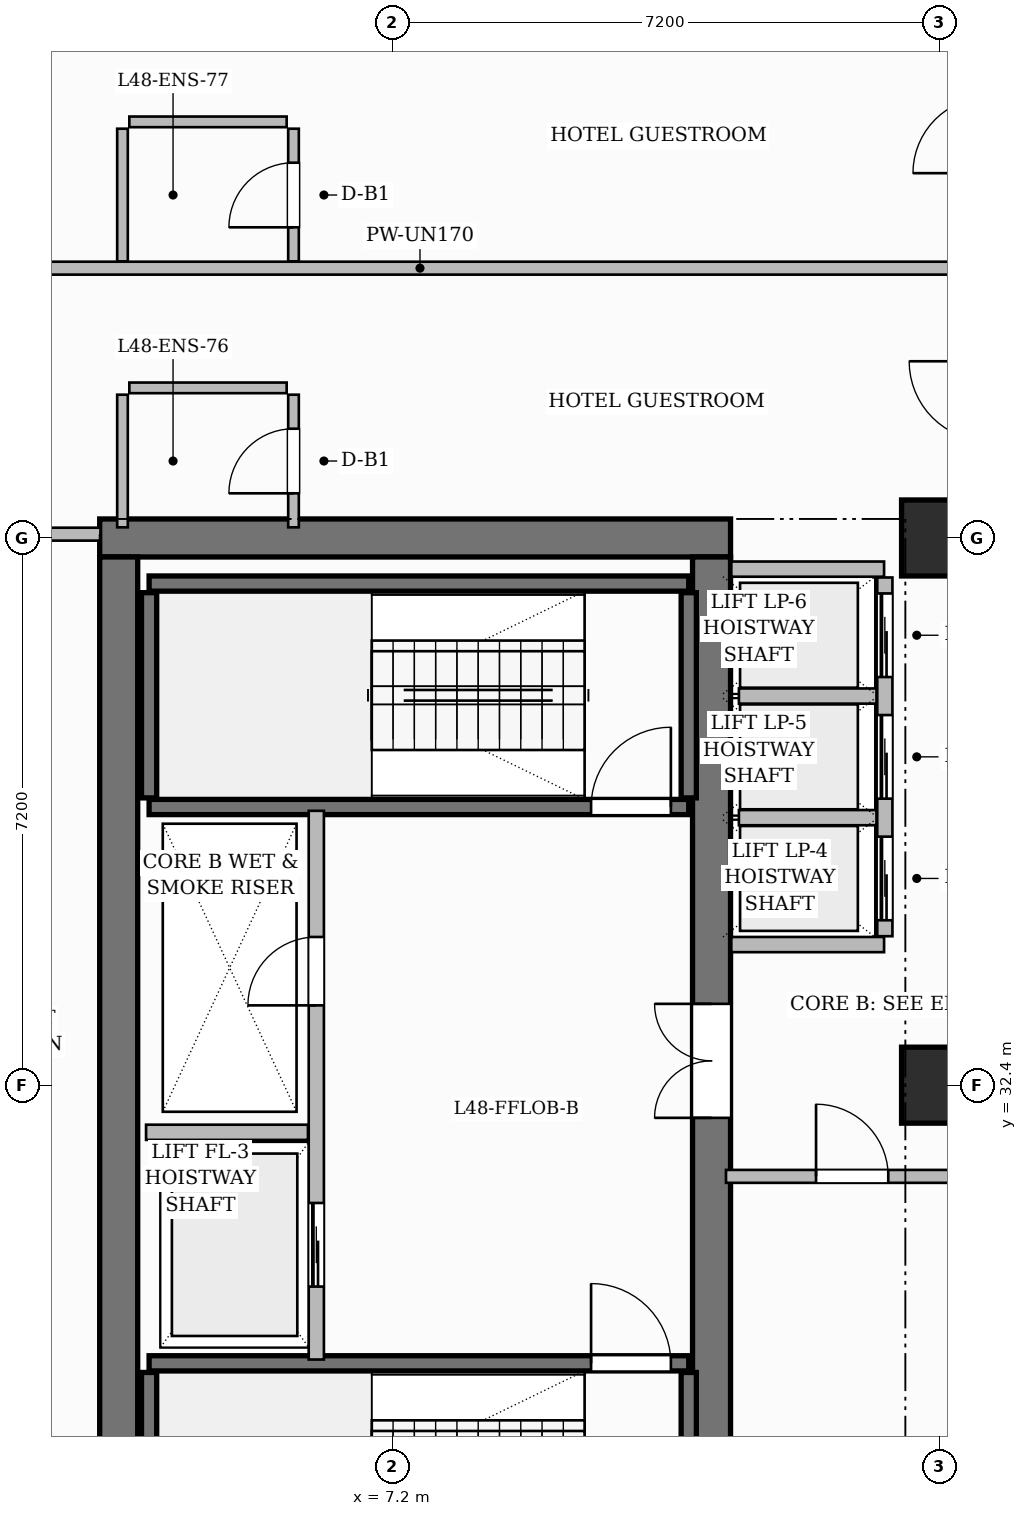
"""IFC4 building model, lengths in metres.
Left out: names, types, materials, properties, quantities, classifications, styles, units other than length and angle.
Written with IfcOpenShell. Run it as: python <this file> out.ifc"""

import sys

from ifc_helpers import new_model, si_unit, direction, frame, frame_2d, origin, origin_2d, place, context, subcontext, project, spatial, rectangle, extrude, source, transform, mapped, element, fill, save


model = new_model("IFC4")
c1 = context("Model", 3, precision=1e-05, world=origin(), true_north=direction((0.0, 1.0)))
c2 = subcontext(c1, "Body", "Model", "MODEL_VIEW")
j1 = project(units=[si_unit("LENGTHUNIT", "METRE"), si_unit("PLANEANGLEUNIT", "RADIAN")], contexts=[c1])
p1 = place(None, origin())
s1 = spatial("IfcSite", under=j1, at=p1, CompositionType="ELEMENT")
p2 = place(p1, origin())
s2 = spatial("IfcBuilding", under=s1, at=p2, CompositionType="ELEMENT")
p3 = place(p2, frame((0.0, 0.0, 192.65)))
s3 = spatial("IfcBuildingStorey", under=s2, at=p3, CompositionType="ELEMENT", Elevation=192.65)
p4 = place(p3, frame((3.35, 39.6, 0.0), z_axis=(0.0, 0.0, 1.0), x_axis=(1.0, 0.0, 0.0)))
e1 = element("IfcWall", 1, at=p4, inside=s3, PredefinedType="SHEAR", context=c2, shape_type="SweptSolid", body=[
    extrude(rectangle(XDim=8.3, YDim=0.5, at=frame_2d((4.15, 0.0))), origin(), (0.0, 0.0, 1.0), 3.85),
])
p5 = place(p3, frame((3.6, 25.45, 0.0), z_axis=(0.0, 0.0, 1.0), x_axis=(0.0, 1.0, 0.0)))
e2 = element("IfcWall", 2, at=p5, inside=s3, PredefinedType="SHEAR", context=c2, shape_type="SweptSolid", body=[
    extrude(rectangle(XDim=13.9, YDim=0.5, at=frame_2d((6.95, 0.0))), origin(), (0.0, 0.0, 1.0), 3.85),
])
p6 = place(p3, frame((11.4, 25.45, 0.0), z_axis=(0.0, 0.0, 1.0), x_axis=(0.0, 1.0, 0.0)))
e3 = element("IfcWall", 3, at=p6, inside=s3, PredefinedType="SHEAR", context=c2, shape_type="SweptSolid", body=[
    extrude(rectangle(XDim=13.9, YDim=0.5, at=frame_2d((6.95, 0.0))), origin(), (0.0, 0.0, 1.0), 3.85),
])
p7 = place(p6, frame((6.52, 0.0, 0.0)))
e4 = element("IfcOpeningElement", 4, at=p7, cuts=e3, PredefinedType="OPENING", context=c2, shape_type="SweptSolid", body=[
    extrude(rectangle(XDim=1.5, YDim=2.2, at=frame_2d((0.75, 1.1))), frame((0.0, 0.26, 0.0), z_axis=(0.0, -1.0, 0.0), x_axis=(1.0, 0.0, 0.0)), (0.0, 0.0, 1.0), 0.52),
])
m1 = source(origin(), c2, "Body", "SweptSolid", [
    extrude(rectangle(XDim=1.0, YDim=1.0, at=origin_2d()), origin(), (0.0, 0.0, 1.0), 3.85),
])
for number, where, z_axis, x_axis in (
    (5, (14.4, 32.4, 0.0), (0.0, 0.0, 1.0), (1.0, 0.0, 0.0)),
    (6, (14.4, 39.6, 0.0), (0.0, 0.0, 1.0), (1.0, 0.0, 0.0)),
):
    element("IfcColumn", number, at=place(p3, frame(where, z_axis=z_axis, x_axis=x_axis)), inside=s3, PredefinedType="COLUMN", context=c2, shape_type="MappedRepresentation", body=[
        mapped(m1, transform((0.0, 0.0, 0.0), scale=1.0)),
    ])
for number, where, z_axis, x_axis in (
    (7, (4.0, 25.92, 0.0), (0.0, 0.0, 1.0), (0.0, 1.0, 0.0)),
    (8, (11.1, 25.92, 0.0), (0.0, 0.0, 1.0), (0.0, 1.0, 0.0)),
):
    element("IfcWall", number, at=place(p3, frame(where, z_axis=z_axis, x_axis=x_axis)), inside=s3, PredefinedType="SHEAR", context=c2, shape_type="SweptSolid", body=[
        extrude(rectangle(XDim=2.7, YDim=0.2, at=frame_2d((1.35, 0.0))), origin(), (0.0, 0.0, 1.0), 3.85),
    ])
p8 = place(p3, frame((4.0, 28.74, 0.0), z_axis=(0.0, 0.0, 1.0), x_axis=(1.0, 0.0, 0.0)))
e9 = element("IfcWall", 9, at=p8, inside=s3, PredefinedType="SHEAR", context=c2, shape_type="SweptSolid", body=[
    extrude(rectangle(XDim=7.1, YDim=0.2, at=frame_2d((3.55, 0.0))), origin(), (0.0, 0.0, 1.0), 3.85),
])
p9 = place(p8, frame((5.815, 0.0, 0.0)))
e10 = element("IfcOpeningElement", 10, at=p9, cuts=e9, PredefinedType="OPENING", context=c2, shape_type="SweptSolid", body=[
    extrude(rectangle(XDim=1.05, YDim=2.2, at=frame_2d((0.525, 1.1))), frame((0.0, 0.11, 0.0), z_axis=(0.0, -1.0, 0.0), x_axis=(1.0, 0.0, 0.0)), (0.0, 0.0, 1.0), 0.22),
])
p10 = place(p3, frame((4.0, 39.0, 0.0), z_axis=(0.0, 0.0, 1.0), x_axis=(1.0, 0.0, 0.0)))
e11 = element("IfcWall", 11, at=p10, inside=s3, PredefinedType="SHEAR", context=c2, shape_type="SweptSolid", body=[
    extrude(rectangle(XDim=7.1, YDim=0.2, at=frame_2d((3.55, 0.0))), origin(), (0.0, 0.0, 1.0), 3.85),
])
for number, where, z_axis, x_axis in (
    (12, (4.0, 36.18, 0.0), (0.0, 0.0, 1.0), (0.0, 1.0, 0.0)),
    (13, (11.1, 36.18, 0.0), (0.0, 0.0, 1.0), (0.0, 1.0, 0.0)),
):
    element("IfcWall", number, at=place(p3, frame(where, z_axis=z_axis, x_axis=x_axis)), inside=s3, PredefinedType="SHEAR", context=c2, shape_type="SweptSolid", body=[
        extrude(rectangle(XDim=2.7, YDim=0.2, at=frame_2d((1.35, 0.0))), origin(), (0.0, 0.0, 1.0), 3.85),
    ])
p11 = place(p3, frame((4.0, 36.06, 0.0), z_axis=(0.0, 0.0, 1.0), x_axis=(1.0, 0.0, 0.0)))
e14 = element("IfcWall", 14, at=p11, inside=s3, PredefinedType="SHEAR", context=c2, shape_type="SweptSolid", body=[
    extrude(rectangle(XDim=7.1, YDim=0.2, at=frame_2d((3.55, 0.0))), origin(), (0.0, 0.0, 1.0), 3.85),
])
p12 = place(p11, frame((5.815, 0.0, 0.0)))
e15 = element("IfcOpeningElement", 15, at=p12, cuts=e14, PredefinedType="OPENING", context=c2, shape_type="SweptSolid", body=[
    extrude(rectangle(XDim=1.05, YDim=2.2, at=frame_2d((0.525, 1.1))), frame((0.0, 0.11, 0.0), z_axis=(0.0, -1.0, 0.0), x_axis=(1.0, 0.0, 0.0)), (0.0, 0.0, 1.0), 0.22),
])
p13 = place(p3, frame((6.2, 28.79, 0.0), z_axis=(0.0, 0.0, 1.0), x_axis=(0.0, 1.0, 0.0)))
e16 = element("IfcWall", 16, at=p13, inside=s3, PredefinedType="PARTITIONING", context=c2, shape_type="SweptSolid", body=[
    extrude(rectangle(XDim=7.22, YDim=0.2, at=frame_2d((3.61, 0.0))), origin(), (0.0, 0.0, 1.0), 3.55),
])
p14 = place(p13, frame((4.66, 0.0, 0.0)))
e17 = element("IfcOpeningElement", 17, at=p14, cuts=e16, PredefinedType="OPENING", context=c2, shape_type="SweptSolid", body=[
    extrude(rectangle(XDim=0.9, YDim=2.1, at=frame_2d((0.45, 1.05))), frame((0.0, 0.11, 0.0), z_axis=(0.0, -1.0, 0.0), x_axis=(1.0, 0.0, 0.0)), (0.0, 0.0, 1.0), 0.22),
])
p15 = place(p13, frame((0.96, 0.0, 0.0)))
e18 = element("IfcOpeningElement", 18, at=p15, cuts=e16, PredefinedType="OPENING", context=c2, shape_type="SweptSolid", body=[
    extrude(rectangle(XDim=1.1, YDim=2.2, at=frame_2d((0.55, 1.1))), frame((0.0, 0.11, 0.0), z_axis=(0.0, -1.0, 0.0), x_axis=(1.0, 0.0, 0.0)), (0.0, 0.0, 1.0), 0.22),
])
p16 = place(p3, frame((3.96, 31.78, 0.0), z_axis=(0.0, 0.0, 1.0), x_axis=(1.0, 0.0, 0.0)))
e19 = element("IfcWall", 19, at=p16, inside=s3, PredefinedType="PARTITIONING", context=c2, shape_type="SweptSolid", body=[
    extrude(rectangle(XDim=2.13, YDim=0.2, at=frame_2d((1.065, 0.0))), origin(), (0.0, 0.0, 1.0), 3.55),
])
for number, where, z_axis, x_axis in (
    (20, (11.66, 34.25, 0.0), (0.0, 0.0, 1.0), (1.0, 0.0, 0.0)),
    (21, (11.66, 39.19, 0.0), (0.0, 0.0, 1.0), (1.0, 0.0, 0.0)),
):
    element("IfcWall", number, at=place(p3, frame(where, z_axis=z_axis, x_axis=x_axis)), inside=s3, PredefinedType="PARTITIONING", context=c2, shape_type="SweptSolid", body=[
        extrude(rectangle(XDim=2.01, YDim=0.2, at=frame_2d((1.005, 0.0))), origin(), (0.0, 0.0, 1.0), 3.55),
    ])
p17 = place(p3, frame((13.68, 34.36, 0.0), z_axis=(0.0, 0.0, 1.0), x_axis=(0.0, 1.0, 0.0)))
e22 = element("IfcWall", 22, at=p17, inside=s3, PredefinedType="PARTITIONING", context=c2, shape_type="SweptSolid", body=[
    extrude(rectangle(XDim=4.72, YDim=0.2, at=frame_2d((2.36, 0.0))), origin(), (0.0, 0.0, 1.0), 3.55),
])
p18 = place(p17, frame((0.21, 0.0, 0.0)))
e23 = element("IfcOpeningElement", 23, at=p18, cuts=e22, PredefinedType="OPENING", context=c2, shape_type="SweptSolid", body=[
    extrude(rectangle(XDim=1.1, YDim=2.2, at=frame_2d((0.55, 1.1))), frame((0.0, 0.11, 0.0), z_axis=(0.0, -1.0, 0.0), x_axis=(1.0, 0.0, 0.0)), (0.0, 0.0, 1.0), 0.22),
])
p19 = place(p17, frame((1.81, 0.0, 0.0)))
e24 = element("IfcOpeningElement", 24, at=p19, cuts=e22, PredefinedType="OPENING", context=c2, shape_type="SweptSolid", body=[
    extrude(rectangle(XDim=1.1, YDim=2.2, at=frame_2d((0.55, 1.1))), frame((0.0, 0.11, 0.0), z_axis=(0.0, -1.0, 0.0), x_axis=(1.0, 0.0, 0.0)), (0.0, 0.0, 1.0), 0.22),
])
p20 = place(p17, frame((3.41, 0.0, 0.0)))
e25 = element("IfcOpeningElement", 25, at=p20, cuts=e22, PredefinedType="OPENING", context=c2, shape_type="SweptSolid", body=[
    extrude(rectangle(XDim=1.1, YDim=2.2, at=frame_2d((0.55, 1.1))), frame((0.0, 0.11, 0.0), z_axis=(0.0, -1.0, 0.0), x_axis=(1.0, 0.0, 0.0)), (0.0, 0.0, 1.0), 0.22),
])
for number, where, z_axis, x_axis in (
    (26, (11.76, 35.92, 0.0), (0.0, 0.0, 1.0), (1.0, 0.0, 0.0)),
    (27, (11.76, 37.52, 0.0), (0.0, 0.0, 1.0), (1.0, 0.0, 0.0)),
):
    element("IfcWall", number, at=place(p3, frame(where, z_axis=z_axis, x_axis=x_axis)), inside=s3, PredefinedType="PARTITIONING", context=c2, shape_type="SweptSolid", body=[
        extrude(rectangle(XDim=1.81, YDim=0.2, at=frame_2d((0.905, 0.0))), origin(), (0.0, 0.0, 1.0), 3.55),
    ])
p21 = place(p3, frame((0.24, 39.65, 0.0), z_axis=(0.0, 0.0, 1.0), x_axis=(1.0, 0.0, 0.0)))
e28 = element("IfcWall", 28, at=p21, inside=s3, PredefinedType="PARTITIONING", context=c2, shape_type="SweptSolid", body=[
    extrude(rectangle(XDim=3.12, YDim=0.17, at=frame_2d((1.56, 0.0))), origin(), (0.0, 0.0, 1.0), 3.55),
])
p22 = place(p21, frame((1.11, 0.0, 0.0)))
e29 = element("IfcOpeningElement", 29, at=p22, cuts=e28, PredefinedType="OPENING", context=c2, shape_type="SweptSolid", body=[
    extrude(rectangle(XDim=0.9, YDim=2.15, at=frame_2d((0.45, 1.075))), frame((0.0, 0.095, 0.0), z_axis=(0.0, -1.0, 0.0), x_axis=(1.0, 0.0, 0.0)), (0.0, 0.0, 1.0), 0.19),
])
p23 = place(p3, frame((0.168, 43.15, 0.0), z_axis=(0.0, 0.0, 1.0), x_axis=(1.0, 0.0, 0.0)))
e30 = element("IfcWall", 30, at=p23, inside=s3, PredefinedType="PARTITIONING", context=c2, shape_type="SweptSolid", body=[
    extrude(rectangle(XDim=14.792, YDim=0.17, at=frame_2d((7.396, 0.0))), origin(), (0.0, 0.0, 1.0), 3.55),
])
p24 = place(p3, frame((3.65, 39.74, 0.0), z_axis=(0.0, 0.0, 1.0), x_axis=(0.0, 1.0, 0.0)))
e31 = element("IfcWall", 31, at=p24, inside=s3, PredefinedType="PARTITIONING", context=c2, shape_type="SweptSolid", body=[
    extrude(rectangle(XDim=1.745, YDim=0.14, at=frame_2d((0.873, 0.0))), origin(), (0.0, 0.0, 1.0), 3.55),
])
p25 = place(p3, frame((3.74, 41.575, 0.0), z_axis=(0.0, 0.0, 1.0), x_axis=(1.0, 0.0, 0.0)))
e32 = element("IfcWall", 32, at=p25, inside=s3, PredefinedType="PARTITIONING", context=c2, shape_type="SweptSolid", body=[
    extrude(rectangle(XDim=2.07, YDim=0.14, at=frame_2d((1.035, 0.0))), origin(), (0.0, 0.0, 1.0), 3.55),
])
p26 = place(p3, frame((5.9, 39.74, 0.0), z_axis=(0.0, 0.0, 1.0), x_axis=(0.0, 1.0, 0.0)))
e33 = element("IfcWall", 33, at=p26, inside=s3, PredefinedType="PARTITIONING", context=c2, shape_type="SweptSolid", body=[
    extrude(rectangle(XDim=1.745, YDim=0.14, at=frame_2d((0.873, 0.0))), origin(), (0.0, 0.0, 1.0), 3.55),
])
p27 = place(p26, frame((0.448, 0.0, 0.0)))
e34 = element("IfcOpeningElement", 34, at=p27, cuts=e33, PredefinedType="OPENING", context=c2, shape_type="SweptSolid", body=[
    extrude(rectangle(XDim=0.85, YDim=2.1, at=frame_2d((0.425, 1.05))), frame((0.0, 0.08, 0.0), z_axis=(0.0, -1.0, 0.0), x_axis=(1.0, 0.0, 0.0)), (0.0, 0.0, 1.0), 0.16),
])
p28 = place(p3, frame((3.65, 43.24, 0.0), z_axis=(0.0, 0.0, 1.0), x_axis=(0.0, 1.0, 0.0)))
e35 = element("IfcWall", 35, at=p28, inside=s3, PredefinedType="PARTITIONING", context=c2, shape_type="SweptSolid", body=[
    extrude(rectangle(XDim=1.745, YDim=0.14, at=frame_2d((0.873, 0.0))), origin(), (0.0, 0.0, 1.0), 3.55),
])
p29 = place(p3, frame((3.74, 45.075, 0.0), z_axis=(0.0, 0.0, 1.0), x_axis=(1.0, 0.0, 0.0)))
e36 = element("IfcWall", 36, at=p29, inside=s3, PredefinedType="PARTITIONING", context=c2, shape_type="SweptSolid", body=[
    extrude(rectangle(XDim=2.07, YDim=0.14, at=frame_2d((1.035, 0.0))), origin(), (0.0, 0.0, 1.0), 3.55),
])
p30 = place(p3, frame((5.9, 43.24, 0.0), z_axis=(0.0, 0.0, 1.0), x_axis=(0.0, 1.0, 0.0)))
e37 = element("IfcWall", 37, at=p30, inside=s3, PredefinedType="PARTITIONING", context=c2, shape_type="SweptSolid", body=[
    extrude(rectangle(XDim=1.745, YDim=0.14, at=frame_2d((0.873, 0.0))), origin(), (0.0, 0.0, 1.0), 3.55),
])
p31 = place(p30, frame((0.448, 0.0, 0.0)))
e38 = element("IfcOpeningElement", 38, at=p31, cuts=e37, PredefinedType="OPENING", context=c2, shape_type="SweptSolid", body=[
    extrude(rectangle(XDim=0.85, YDim=2.1, at=frame_2d((0.425, 1.05))), frame((0.0, 0.08, 0.0), z_axis=(0.0, -1.0, 0.0), x_axis=(1.0, 0.0, 0.0)), (0.0, 0.0, 1.0), 0.16),
])
p32 = place(p3, frame((11.59, 31.2, 0.0), z_axis=(0.0, 0.0, 1.0), x_axis=(1.0, 0.0, 0.0)))
e39 = element("IfcWall", 39, at=p32, inside=s3, PredefinedType="PARTITIONING", context=c2, shape_type="SweptSolid", body=[
    extrude(rectangle(XDim=3.37, YDim=0.17, at=frame_2d((1.685, 0.0))), origin(), (0.0, 0.0, 1.0), 3.55),
])
p33 = place(p32, frame((1.185, 0.0, 0.0)))
e40 = element("IfcOpeningElement", 40, at=p33, cuts=e39, PredefinedType="OPENING", context=c2, shape_type="SweptSolid", body=[
    extrude(rectangle(XDim=0.95, YDim=2.15, at=frame_2d((0.475, 1.075))), frame((0.0, 0.095, 0.0), z_axis=(0.0, -1.0, 0.0), x_axis=(1.0, 0.0, 0.0)), (0.0, 0.0, 1.0), 0.19),
])
m2 = source(origin(), c2, "Body", "SweptSolid", [
    extrude(rectangle(XDim=1.05, YDim=2.2, at=frame_2d((0.525, 1.1))), frame((0.0, 0.025, 0.0), z_axis=(0.0, -1.0, 0.0), x_axis=(1.0, 0.0, 0.0)), (0.0, 0.0, 1.0), 0.05),
])
p34 = place(p9, origin())
e41 = element("IfcDoor", 41, at=p34, inside=s3, OperationType="SINGLE_SWING_LEFT", PredefinedType="DOOR", context=c2, shape_type="MappedRepresentation", body=[
    mapped(m2, transform((0.0, 0.0, 0.0), scale=1.0)),
])
fill(e10, e41)
p35 = place(p12, origin())
e42 = element("IfcDoor", 42, at=p35, inside=s3, OperationType="SINGLE_SWING_RIGHT", PredefinedType="DOOR", context=c2, shape_type="MappedRepresentation", body=[
    mapped(m2, transform((0.0, 0.0, 0.0), scale=1.0)),
])
fill(e15, e42)
m3 = source(origin(), c2, "Body", "SweptSolid", [
    extrude(rectangle(XDim=0.9, YDim=2.1, at=frame_2d((0.45, 1.05))), frame((0.0, 0.025, 0.0), z_axis=(0.0, -1.0, 0.0), x_axis=(1.0, 0.0, 0.0)), (0.0, 0.0, 1.0), 0.05),
])
p36 = place(p14, origin())
e43 = element("IfcDoor", 43, at=p36, inside=s3, OperationType="SINGLE_SWING_LEFT", PredefinedType="DOOR", context=c2, shape_type="MappedRepresentation", body=[
    mapped(m3, transform((0.0, 0.0, 0.0), scale=1.0)),
])
fill(e17, e43)
m4 = source(origin(), c2, "Body", "SweptSolid", [
    extrude(rectangle(XDim=1.5, YDim=2.2, at=frame_2d((0.75, 1.1))), frame((0.0, 0.025, 0.0), z_axis=(0.0, -1.0, 0.0), x_axis=(1.0, 0.0, 0.0)), (0.0, 0.0, 1.0), 0.05),
])
p37 = place(p7, origin())
e44 = element("IfcDoor", 44, at=p37, inside=s3, OperationType="DOUBLE_DOOR_SINGLE_SWING", PredefinedType="DOOR", context=c2, shape_type="MappedRepresentation", body=[
    mapped(m4, transform((0.0, 0.0, 0.0), scale=1.0)),
])
fill(e4, e44)
m5 = source(origin(), c2, "Body", "SweptSolid", [
    extrude(rectangle(XDim=0.85, YDim=2.1, at=frame_2d((0.425, 1.05))), frame((0.0, 0.025, 0.0), z_axis=(0.0, -1.0, 0.0), x_axis=(1.0, 0.0, 0.0)), (0.0, 0.0, 1.0), 0.05),
])
p38 = place(p27, origin())
e45 = element("IfcDoor", 45, at=p38, inside=s3, OperationType="SINGLE_SWING_LEFT", PredefinedType="DOOR", context=c2, shape_type="MappedRepresentation", body=[
    mapped(m5, transform((0.0, 0.0, 0.0), scale=1.0)),
])
fill(e34, e45)
p39 = place(p31, origin())
e46 = element("IfcDoor", 46, at=p39, inside=s3, OperationType="SINGLE_SWING_LEFT", PredefinedType="DOOR", context=c2, shape_type="MappedRepresentation", body=[
    mapped(m5, transform((0.0, 0.0, 0.0), scale=1.0)),
])
fill(e38, e46)
m6 = source(origin(), c2, "Body", "SweptSolid", [
    extrude(rectangle(XDim=0.95, YDim=2.15, at=frame_2d((0.475, 1.075))), frame((0.0, 0.025, 0.0), z_axis=(0.0, -1.0, 0.0), x_axis=(1.0, 0.0, 0.0)), (0.0, 0.0, 1.0), 0.05),
])
p40 = place(p33, origin())
e47 = element("IfcDoor", 47, at=p40, inside=s3, OperationType="SINGLE_SWING_LEFT", PredefinedType="DOOR", context=c2, shape_type="MappedRepresentation", body=[
    mapped(m6, transform((0.0, 0.0, 0.0), scale=1.0)),
])
fill(e40, e47)
m7 = source(origin(), c2, "Body", "SweptSolid", [
    extrude(rectangle(XDim=1.1, YDim=2.2, at=frame_2d((0.55, 1.1))), frame((0.0, 0.025, 0.0), z_axis=(0.0, -1.0, 0.0), x_axis=(1.0, 0.0, 0.0)), (0.0, 0.0, 1.0), 0.05),
])
p41 = place(p15, origin())
e48 = element("IfcDoor", 48, at=p41, inside=s3, OperationType="SLIDING_TO_LEFT", PredefinedType="DOOR", context=c2, shape_type="MappedRepresentation", body=[
    mapped(m7, transform((0.0, 0.0, 0.0), scale=1.0)),
])
fill(e18, e48)
p42 = place(p18, origin())
e49 = element("IfcDoor", 49, at=p42, inside=s3, OperationType="SLIDING_TO_LEFT", PredefinedType="DOOR", context=c2, shape_type="MappedRepresentation", body=[
    mapped(m7, transform((0.0, 0.0, 0.0), scale=1.0)),
])
fill(e23, e49)
p43 = place(p19, origin())
e50 = element("IfcDoor", 50, at=p43, inside=s3, OperationType="SLIDING_TO_LEFT", PredefinedType="DOOR", context=c2, shape_type="MappedRepresentation", body=[
    mapped(m7, transform((0.0, 0.0, 0.0), scale=1.0)),
])
fill(e24, e50)
p44 = place(p20, origin())
e51 = element("IfcDoor", 51, at=p44, inside=s3, OperationType="SLIDING_TO_LEFT", PredefinedType="DOOR", context=c2, shape_type="MappedRepresentation", body=[
    mapped(m7, transform((0.0, 0.0, 0.0), scale=1.0)),
])
fill(e25, e51)
save(model, sys.argv[1])
